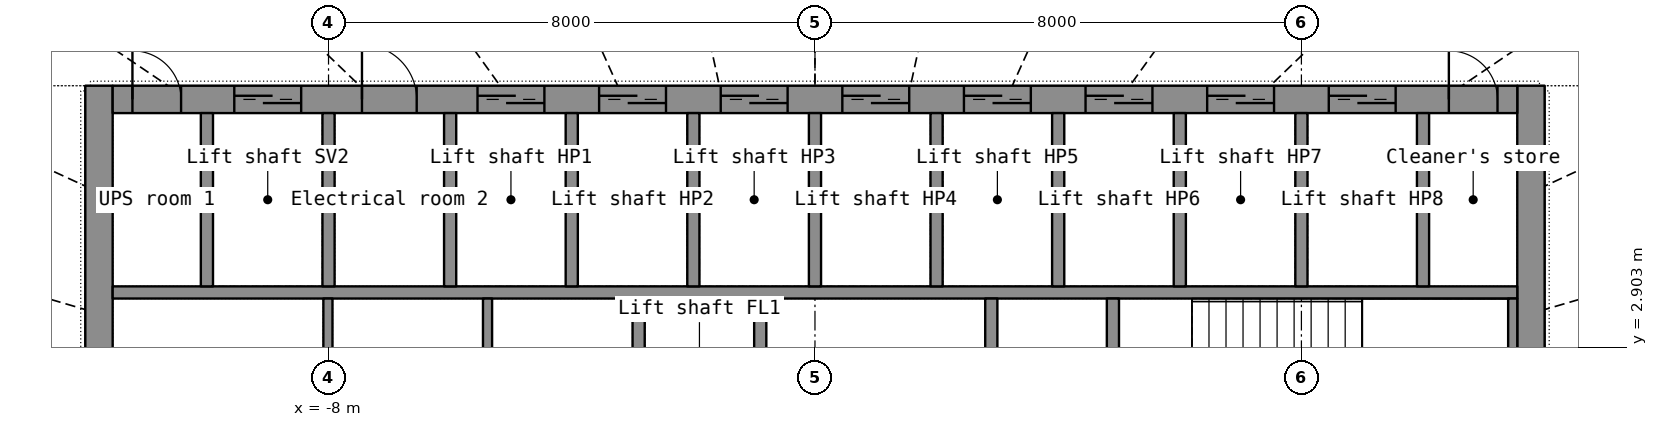
"""IFC4 building model, lengths in metres.
Left out: names, types, materials, properties, quantities, classifications, styles, units other than length and angle.
Written with IfcOpenShell. Run it as: python <this file> out.ifc"""

import sys

from ifc_helpers import new_model, si_unit, direction, frame, frame_2d, origin, place, context, subcontext, project, spatial, rectangle, extrude, element, fill, save


model = new_model("IFC4")
c1 = context("Model", 3, precision=1e-05, world=origin(), true_north=direction((0.0, 1.0)))
c2 = subcontext(c1, "Body", "Model", "MODEL_VIEW")
j1 = project(units=[si_unit("LENGTHUNIT", "METRE"), si_unit("PLANEANGLEUNIT", "RADIAN")], contexts=[c1])
p1 = place(None, origin())
s1 = spatial("IfcSite", under=j1, at=p1, CompositionType="ELEMENT")
p2 = place(p1, origin())
s2 = spatial("IfcBuilding", under=s1, at=p2, CompositionType="ELEMENT")
p3 = place(p2, frame((0.0, 0.0, 160.8)))
s3 = spatial("IfcBuildingStorey", under=s2, at=p3, CompositionType="ELEMENT", Elevation=160.8)
p4 = place(p3, frame((-11.775, -7.2, 0.0), z_axis=(0.0, 0.0, 1.0), x_axis=(0.0, 1.0, 0.0)))
e1 = element("IfcWall", 1, at=p4, inside=s3, PredefinedType="SHEAR", context=c2, shape_type="SweptSolid", body=[
    extrude(rectangle(XDim=14.4, YDim=0.45, at=frame_2d((7.2, 0.0))), origin(), (0.0, 0.0, 1.0), 3.3),
])
p5 = place(p4, frame((6.5, 0.0, 0.0)))
e2 = element("IfcOpeningElement", 2, at=p5, cuts=e1, PredefinedType="OPENING", context=c2, shape_type="SweptSolid", body=[
    extrude(rectangle(XDim=1.4, YDim=2.2, at=frame_2d((0.7, 1.1))), frame((0.0, 0.235, 0.0), z_axis=(0.0, -1.0, 0.0), x_axis=(1.0, 0.0, 0.0)), (0.0, 0.0, 1.0), 0.47),
])
p6 = place(p3, frame((11.775, -7.2, 0.0), z_axis=(0.0, 0.0, 1.0), x_axis=(0.0, 1.0, 0.0)))
e3 = element("IfcWall", 3, at=p6, inside=s3, PredefinedType="SHEAR", context=c2, shape_type="SweptSolid", body=[
    extrude(rectangle(XDim=14.4, YDim=0.45, at=frame_2d((7.2, 0.0))), origin(), (0.0, 0.0, 1.0), 3.3),
])
p7 = place(p6, frame((6.5, 0.0, 0.0)))
e4 = element("IfcOpeningElement", 4, at=p7, cuts=e3, PredefinedType="OPENING", context=c2, shape_type="SweptSolid", body=[
    extrude(rectangle(XDim=1.4, YDim=2.2, at=frame_2d((0.7, 1.1))), frame((0.0, 0.235, 0.0), z_axis=(0.0, -1.0, 0.0), x_axis=(1.0, 0.0, 0.0)), (0.0, 0.0, 1.0), 0.47),
])
p8 = place(p3, frame((-11.55, 6.975, 0.0), z_axis=(0.0, 0.0, 1.0), x_axis=(1.0, 0.0, 0.0)))
e5 = element("IfcWall", 5, at=p8, inside=s3, PredefinedType="SHEAR", context=c2, shape_type="SweptSolid", body=[
    extrude(rectangle(XDim=23.1, YDim=0.45, at=frame_2d((11.55, 0.0))), origin(), (0.0, 0.0, 1.0), 3.3),
])
p9 = place(p8, frame((2.0, 0.0, 0.0)))
e6 = element("IfcOpeningElement", 6, at=p9, cuts=e5, PredefinedType="OPENING", context=c2, shape_type="SweptSolid", body=[
    extrude(rectangle(XDim=1.1, YDim=2.2, at=frame_2d((0.55, 1.1))), frame((0.0, 0.235, 0.0), z_axis=(0.0, -1.0, 0.0), x_axis=(1.0, 0.0, 0.0)), (0.0, 0.0, 1.0), 0.47),
])
p10 = place(p8, frame((6.0, 0.0, 0.0)))
e7 = element("IfcOpeningElement", 7, at=p10, cuts=e5, PredefinedType="OPENING", context=c2, shape_type="SweptSolid", body=[
    extrude(rectangle(XDim=1.1, YDim=2.2, at=frame_2d((0.55, 1.1))), frame((0.0, 0.235, 0.0), z_axis=(0.0, -1.0, 0.0), x_axis=(1.0, 0.0, 0.0)), (0.0, 0.0, 1.0), 0.47),
])
p11 = place(p8, frame((8.0, 0.0, 0.0)))
e8 = element("IfcOpeningElement", 8, at=p11, cuts=e5, PredefinedType="OPENING", context=c2, shape_type="SweptSolid", body=[
    extrude(rectangle(XDim=1.1, YDim=2.2, at=frame_2d((0.55, 1.1))), frame((0.0, 0.235, 0.0), z_axis=(0.0, -1.0, 0.0), x_axis=(1.0, 0.0, 0.0)), (0.0, 0.0, 1.0), 0.47),
])
p12 = place(p8, frame((10.0, 0.0, 0.0)))
e9 = element("IfcOpeningElement", 9, at=p12, cuts=e5, PredefinedType="OPENING", context=c2, shape_type="SweptSolid", body=[
    extrude(rectangle(XDim=1.1, YDim=2.2, at=frame_2d((0.55, 1.1))), frame((0.0, 0.235, 0.0), z_axis=(0.0, -1.0, 0.0), x_axis=(1.0, 0.0, 0.0)), (0.0, 0.0, 1.0), 0.47),
])
p13 = place(p8, frame((12.0, 0.0, 0.0)))
e10 = element("IfcOpeningElement", 10, at=p13, cuts=e5, PredefinedType="OPENING", context=c2, shape_type="SweptSolid", body=[
    extrude(rectangle(XDim=1.1, YDim=2.2, at=frame_2d((0.55, 1.1))), frame((0.0, 0.235, 0.0), z_axis=(0.0, -1.0, 0.0), x_axis=(1.0, 0.0, 0.0)), (0.0, 0.0, 1.0), 0.47),
])
p14 = place(p8, frame((14.0, 0.0, 0.0)))
e11 = element("IfcOpeningElement", 11, at=p14, cuts=e5, PredefinedType="OPENING", context=c2, shape_type="SweptSolid", body=[
    extrude(rectangle(XDim=1.1, YDim=2.2, at=frame_2d((0.55, 1.1))), frame((0.0, 0.235, 0.0), z_axis=(0.0, -1.0, 0.0), x_axis=(1.0, 0.0, 0.0)), (0.0, 0.0, 1.0), 0.47),
])
p15 = place(p8, frame((16.0, 0.0, 0.0)))
e12 = element("IfcOpeningElement", 12, at=p15, cuts=e5, PredefinedType="OPENING", context=c2, shape_type="SweptSolid", body=[
    extrude(rectangle(XDim=1.1, YDim=2.2, at=frame_2d((0.55, 1.1))), frame((0.0, 0.235, 0.0), z_axis=(0.0, -1.0, 0.0), x_axis=(1.0, 0.0, 0.0)), (0.0, 0.0, 1.0), 0.47),
])
p16 = place(p8, frame((18.0, 0.0, 0.0)))
e13 = element("IfcOpeningElement", 13, at=p16, cuts=e5, PredefinedType="OPENING", context=c2, shape_type="SweptSolid", body=[
    extrude(rectangle(XDim=1.1, YDim=2.2, at=frame_2d((0.55, 1.1))), frame((0.0, 0.235, 0.0), z_axis=(0.0, -1.0, 0.0), x_axis=(1.0, 0.0, 0.0)), (0.0, 0.0, 1.0), 0.47),
])
p17 = place(p8, frame((20.0, 0.0, 0.0)))
e14 = element("IfcOpeningElement", 14, at=p17, cuts=e5, PredefinedType="OPENING", context=c2, shape_type="SweptSolid", body=[
    extrude(rectangle(XDim=1.1, YDim=2.2, at=frame_2d((0.55, 1.1))), frame((0.0, 0.235, 0.0), z_axis=(0.0, -1.0, 0.0), x_axis=(1.0, 0.0, 0.0)), (0.0, 0.0, 1.0), 0.47),
])
p18 = place(p8, frame((4.1, 0.0, 0.0)))
e15 = element("IfcOpeningElement", 15, at=p18, cuts=e5, PredefinedType="OPENING", context=c2, shape_type="SweptSolid", body=[
    extrude(rectangle(XDim=0.9, YDim=2.1, at=frame_2d((0.45, 1.05))), frame((0.0, 0.235, 0.0), z_axis=(0.0, -1.0, 0.0), x_axis=(1.0, 0.0, 0.0)), (0.0, 0.0, 1.0), 0.47),
])
p19 = place(p8, frame((0.325, 0.0, 0.0)))
e16 = element("IfcOpeningElement", 16, at=p19, cuts=e5, PredefinedType="OPENING", context=c2, shape_type="SweptSolid", body=[
    extrude(rectangle(XDim=0.8, YDim=2.05, at=frame_2d((0.4, 1.025))), frame((0.0, 0.235, 0.0), z_axis=(0.0, -1.0, 0.0), x_axis=(1.0, 0.0, 0.0)), (0.0, 0.0, 1.0), 0.47),
])
p20 = place(p8, frame((21.975, 0.0, 0.0)))
e17 = element("IfcOpeningElement", 17, at=p20, cuts=e5, PredefinedType="OPENING", context=c2, shape_type="SweptSolid", body=[
    extrude(rectangle(XDim=0.8, YDim=2.05, at=frame_2d((0.4, 1.025))), frame((0.0, 0.235, 0.0), z_axis=(0.0, -1.0, 0.0), x_axis=(1.0, 0.0, 0.0)), (0.0, 0.0, 1.0), 0.47),
])
p21 = place(p3, frame((-11.55, 3.8, 0.0), z_axis=(0.0, 0.0, 1.0), x_axis=(1.0, 0.0, 0.0)))
e18 = element("IfcWall", 18, at=p21, inside=s3, PredefinedType="SHEAR", context=c2, shape_type="SweptSolid", body=[
    extrude(rectangle(XDim=23.1, YDim=0.2, at=frame_2d((11.55, 0.0))), origin(), (0.0, 0.0, 1.0), 3.3),
])
for number, where, z_axis, x_axis in (
    (19, (-10.0, 3.9, 0.0), (0.0, 0.0, 1.0), (0.0, 1.0, 0.0)),
    (20, (-8.0, 3.9, 0.0), (0.0, 0.0, 1.0), (0.0, 1.0, 0.0)),
    (21, (-6.0, 3.9, 0.0), (0.0, 0.0, 1.0), (0.0, 1.0, 0.0)),
    (22, (-4.0, 3.9, 0.0), (0.0, 0.0, 1.0), (0.0, 1.0, 0.0)),
    (23, (-2.0, 3.9, 0.0), (0.0, 0.0, 1.0), (0.0, 1.0, 0.0)),
    (24, (0.0, 3.9, 0.0), (0.0, 0.0, 1.0), (0.0, 1.0, 0.0)),
    (25, (2.0, 3.9, 0.0), (0.0, 0.0, 1.0), (0.0, 1.0, 0.0)),
    (26, (4.0, 3.9, 0.0), (0.0, 0.0, 1.0), (0.0, 1.0, 0.0)),
    (27, (6.0, 3.9, 0.0), (0.0, 0.0, 1.0), (0.0, 1.0, 0.0)),
    (28, (8.0, 3.9, 0.0), (0.0, 0.0, 1.0), (0.0, 1.0, 0.0)),
    (29, (10.0, 3.9, 0.0), (0.0, 0.0, 1.0), (0.0, 1.0, 0.0)),
):
    element("IfcWall", number, at=place(p3, frame(where, z_axis=z_axis, x_axis=x_axis)), inside=s3, PredefinedType="SHEAR", context=c2, shape_type="SweptSolid", body=[
        extrude(rectangle(XDim=2.85, YDim=0.2, at=frame_2d((1.425, 0.0))), origin(), (0.0, 0.0, 1.0), 3.3),
    ])
p22 = place(p3, frame((-2.9, -3.7, 0.0), z_axis=(0.0, 0.0, 1.0), x_axis=(0.0, 1.0, 0.0)))
e30 = element("IfcWall", 30, at=p22, inside=s3, PredefinedType="SHEAR", context=c2, shape_type="SweptSolid", body=[
    extrude(rectangle(XDim=7.4, YDim=0.2, at=frame_2d((3.7, 0.0))), origin(), (0.0, 0.0, 1.0), 3.3),
])
p23 = place(p22, frame((3.1, 0.0, 0.0)))
e31 = element("IfcOpeningElement", 31, at=p23, cuts=e30, PredefinedType="OPENING", context=c2, shape_type="SweptSolid", body=[
    extrude(rectangle(XDim=1.2, YDim=2.2, at=frame_2d((0.6, 1.1))), frame((0.0, 0.11, 0.0), z_axis=(0.0, -1.0, 0.0), x_axis=(1.0, 0.0, 0.0)), (0.0, 0.0, 1.0), 0.22),
])
p24 = place(p3, frame((2.9, -3.7, 0.0), z_axis=(0.0, 0.0, 1.0), x_axis=(0.0, 1.0, 0.0)))
e32 = element("IfcWall", 32, at=p24, inside=s3, PredefinedType="SHEAR", context=c2, shape_type="SweptSolid", body=[
    extrude(rectangle(XDim=7.4, YDim=0.2, at=frame_2d((3.7, 0.0))), origin(), (0.0, 0.0, 1.0), 3.3),
])
p25 = place(p24, frame((3.1, 0.0, 0.0)))
e33 = element("IfcOpeningElement", 33, at=p25, cuts=e32, PredefinedType="OPENING", context=c2, shape_type="SweptSolid", body=[
    extrude(rectangle(XDim=1.2, YDim=2.2, at=frame_2d((0.6, 1.1))), frame((0.0, 0.11, 0.0), z_axis=(0.0, -1.0, 0.0), x_axis=(1.0, 0.0, 0.0)), (0.0, 0.0, 1.0), 0.22),
])
p26 = place(p3, frame((-0.9, 1.35, 0.0), z_axis=(0.0, 0.0, 1.0), x_axis=(0.0, 1.0, 0.0)))
e34 = element("IfcWall", 34, at=p26, inside=s3, PredefinedType="SHEAR", context=c2, shape_type="SweptSolid", body=[
    extrude(rectangle(XDim=2.35, YDim=0.2, at=frame_2d((1.175, 0.0))), origin(), (0.0, 0.0, 1.0), 3.3),
])
p27 = place(p3, frame((11.475, 1.35, 0.0), z_axis=(0.0, 0.0, 1.0), x_axis=(0.0, 1.0, 0.0)))
e35 = element("IfcWall", 35, at=p27, inside=s3, PredefinedType="SHEAR", context=c2, shape_type="SweptSolid", body=[
    extrude(rectangle(XDim=2.35, YDim=0.15, at=frame_2d((1.175, 0.0))), origin(), (0.0, 0.0, 1.0), 3.3),
])
p28 = place(p3, frame((4.9, 1.35, 0.0), z_axis=(0.0, 0.0, 1.0), x_axis=(0.0, 1.0, 0.0)))
e36 = element("IfcWall", 36, at=p28, inside=s3, PredefinedType="SHEAR", context=c2, shape_type="SweptSolid", body=[
    extrude(rectangle(XDim=2.35, YDim=0.2, at=frame_2d((1.175, 0.0))), origin(), (0.0, 0.0, 1.0), 3.3),
])
for number, where, z_axis, x_axis in (
    (37, (-8.01, 1.35, 0.0), (0.0, 0.0, 1.0), (0.0, 1.0, 0.0)),
    (38, (-5.385, 1.35, 0.0), (0.0, 0.0, 1.0), (0.0, 1.0, 0.0)),
):
    element("IfcWall", number, at=place(p3, frame(where, z_axis=z_axis, x_axis=x_axis)), inside=s3, PredefinedType="PARTITIONING", context=c2, shape_type="SweptSolid", body=[
        extrude(rectangle(XDim=2.35, YDim=0.15, at=frame_2d((1.175, 0.0))), origin(), (0.0, 0.0, 1.0), 3.3),
    ])
p29 = place(p9, origin())
e39 = element("IfcDoor", 39, at=p29, inside=s3, OperationType="DOUBLE_DOOR_SLIDING", PredefinedType="DOOR", context=c2, shape_type="SweptSolid", body=[
    extrude(rectangle(XDim=1.1, YDim=2.2, at=frame_2d((0.55, 1.1))), frame((0.0, 0.025, 0.0), z_axis=(0.0, -1.0, 0.0), x_axis=(1.0, 0.0, 0.0)), (0.0, 0.0, 1.0), 0.05),
])
fill(e6, e39)
p30 = place(p10, origin())
e40 = element("IfcDoor", 40, at=p30, inside=s3, OperationType="DOUBLE_DOOR_SLIDING", PredefinedType="DOOR", context=c2, shape_type="SweptSolid", body=[
    extrude(rectangle(XDim=1.1, YDim=2.2, at=frame_2d((0.55, 1.1))), frame((0.0, 0.025, 0.0), z_axis=(0.0, -1.0, 0.0), x_axis=(1.0, 0.0, 0.0)), (0.0, 0.0, 1.0), 0.05),
])
fill(e7, e40)
p31 = place(p11, origin())
e41 = element("IfcDoor", 41, at=p31, inside=s3, OperationType="DOUBLE_DOOR_SLIDING", PredefinedType="DOOR", context=c2, shape_type="SweptSolid", body=[
    extrude(rectangle(XDim=1.1, YDim=2.2, at=frame_2d((0.55, 1.1))), frame((0.0, 0.025, 0.0), z_axis=(0.0, -1.0, 0.0), x_axis=(1.0, 0.0, 0.0)), (0.0, 0.0, 1.0), 0.05),
])
fill(e8, e41)
p32 = place(p12, origin())
e42 = element("IfcDoor", 42, at=p32, inside=s3, OperationType="DOUBLE_DOOR_SLIDING", PredefinedType="DOOR", context=c2, shape_type="SweptSolid", body=[
    extrude(rectangle(XDim=1.1, YDim=2.2, at=frame_2d((0.55, 1.1))), frame((0.0, 0.025, 0.0), z_axis=(0.0, -1.0, 0.0), x_axis=(1.0, 0.0, 0.0)), (0.0, 0.0, 1.0), 0.05),
])
fill(e9, e42)
p33 = place(p13, origin())
e43 = element("IfcDoor", 43, at=p33, inside=s3, OperationType="DOUBLE_DOOR_SLIDING", PredefinedType="DOOR", context=c2, shape_type="SweptSolid", body=[
    extrude(rectangle(XDim=1.1, YDim=2.2, at=frame_2d((0.55, 1.1))), frame((0.0, 0.025, 0.0), z_axis=(0.0, -1.0, 0.0), x_axis=(1.0, 0.0, 0.0)), (0.0, 0.0, 1.0), 0.05),
])
fill(e10, e43)
p34 = place(p14, origin())
e44 = element("IfcDoor", 44, at=p34, inside=s3, OperationType="DOUBLE_DOOR_SLIDING", PredefinedType="DOOR", context=c2, shape_type="SweptSolid", body=[
    extrude(rectangle(XDim=1.1, YDim=2.2, at=frame_2d((0.55, 1.1))), frame((0.0, 0.025, 0.0), z_axis=(0.0, -1.0, 0.0), x_axis=(1.0, 0.0, 0.0)), (0.0, 0.0, 1.0), 0.05),
])
fill(e11, e44)
p35 = place(p15, origin())
e45 = element("IfcDoor", 45, at=p35, inside=s3, OperationType="DOUBLE_DOOR_SLIDING", PredefinedType="DOOR", context=c2, shape_type="SweptSolid", body=[
    extrude(rectangle(XDim=1.1, YDim=2.2, at=frame_2d((0.55, 1.1))), frame((0.0, 0.025, 0.0), z_axis=(0.0, -1.0, 0.0), x_axis=(1.0, 0.0, 0.0)), (0.0, 0.0, 1.0), 0.05),
])
fill(e12, e45)
p36 = place(p16, origin())
e46 = element("IfcDoor", 46, at=p36, inside=s3, OperationType="DOUBLE_DOOR_SLIDING", PredefinedType="DOOR", context=c2, shape_type="SweptSolid", body=[
    extrude(rectangle(XDim=1.1, YDim=2.2, at=frame_2d((0.55, 1.1))), frame((0.0, 0.025, 0.0), z_axis=(0.0, -1.0, 0.0), x_axis=(1.0, 0.0, 0.0)), (0.0, 0.0, 1.0), 0.05),
])
fill(e13, e46)
p37 = place(p17, origin())
e47 = element("IfcDoor", 47, at=p37, inside=s3, OperationType="DOUBLE_DOOR_SLIDING", PredefinedType="DOOR", context=c2, shape_type="SweptSolid", body=[
    extrude(rectangle(XDim=1.1, YDim=2.2, at=frame_2d((0.55, 1.1))), frame((0.0, 0.025, 0.0), z_axis=(0.0, -1.0, 0.0), x_axis=(1.0, 0.0, 0.0)), (0.0, 0.0, 1.0), 0.05),
])
fill(e14, e47)
p38 = place(p18, origin())
e48 = element("IfcDoor", 48, at=p38, inside=s3, OperationType="SINGLE_SWING_LEFT", PredefinedType="DOOR", context=c2, shape_type="SweptSolid", body=[
    extrude(rectangle(XDim=0.9, YDim=2.1, at=frame_2d((0.45, 1.05))), frame((0.0, 0.025, 0.0), z_axis=(0.0, -1.0, 0.0), x_axis=(1.0, 0.0, 0.0)), (0.0, 0.0, 1.0), 0.05),
])
fill(e15, e48)
p39 = place(p19, origin())
e49 = element("IfcDoor", 49, at=p39, inside=s3, OperationType="SINGLE_SWING_LEFT", PredefinedType="DOOR", context=c2, shape_type="SweptSolid", body=[
    extrude(rectangle(XDim=0.8, YDim=2.05, at=frame_2d((0.4, 1.025))), frame((0.0, 0.025, 0.0), z_axis=(0.0, -1.0, 0.0), x_axis=(1.0, 0.0, 0.0)), (0.0, 0.0, 1.0), 0.05),
])
fill(e16, e49)
p40 = place(p20, origin())
e50 = element("IfcDoor", 50, at=p40, inside=s3, OperationType="SINGLE_SWING_LEFT", PredefinedType="DOOR", context=c2, shape_type="SweptSolid", body=[
    extrude(rectangle(XDim=0.8, YDim=2.05, at=frame_2d((0.4, 1.025))), frame((0.0, 0.025, 0.0), z_axis=(0.0, -1.0, 0.0), x_axis=(1.0, 0.0, 0.0)), (0.0, 0.0, 1.0), 0.05),
])
fill(e17, e50)
save(model, sys.argv[1])
